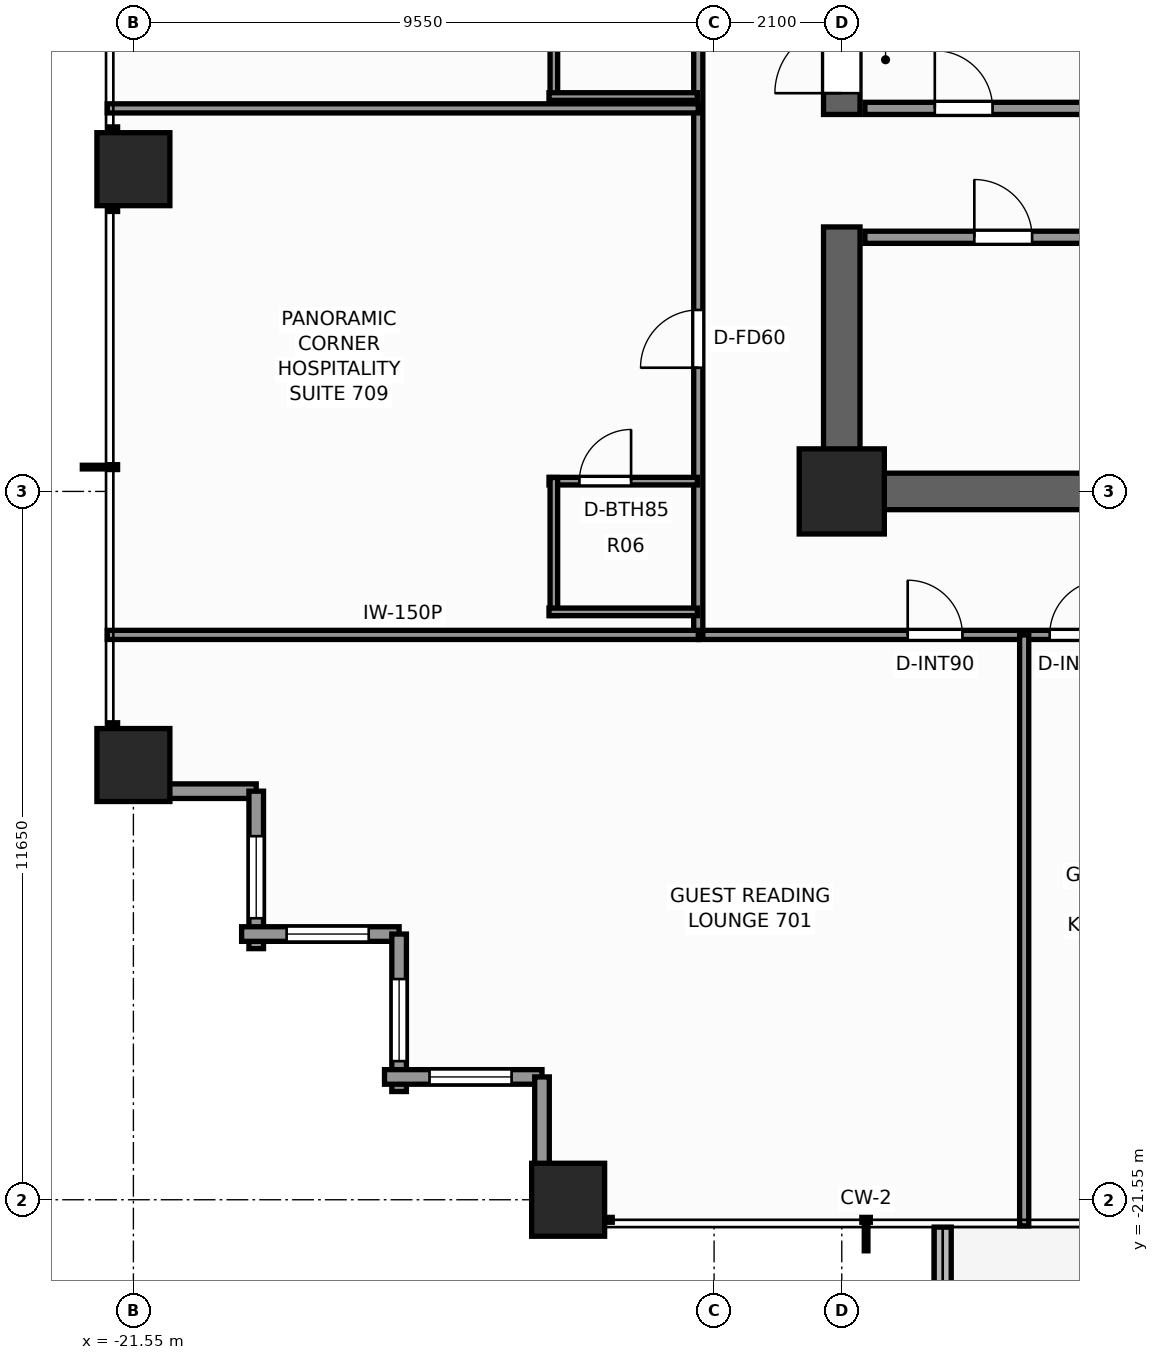
"""IFC4 building model, lengths in metres.
Left out: names, types, materials, properties, quantities, classifications, styles, units other than length and angle.
Written with IfcOpenShell. Run it as: python <this file> out.ifc"""

import sys

from ifc_helpers import new_model, si_unit, direction, frame, frame_2d, origin, origin_2d, place, context, subcontext, project, spatial, rectangle, extrude, element, fill, save


model = new_model("IFC4")
c1 = context("Model", 3, precision=1e-05, world=origin(), true_north=direction((0.0, 1.0)))
c2 = subcontext(c1, "Body", "Model", "MODEL_VIEW")
j1 = project(units=[si_unit("LENGTHUNIT", "METRE"), si_unit("PLANEANGLEUNIT", "RADIAN")], contexts=[c1])
p1 = place(None, origin())
s1 = spatial("IfcSite", under=j1, at=p1, CompositionType="ELEMENT")
p2 = place(p1, origin())
s2 = spatial("IfcBuilding", under=s1, at=p2, CompositionType="ELEMENT")
p3 = place(p2, frame((0.0, 0.0, 27.1)))
s3 = spatial("IfcBuildingStorey", under=s2, at=p3, CompositionType="ELEMENT", Elevation=27.1)
p4 = place(p3, frame((-3.54, -9.9, 0.0), z_axis=(0.0, 0.0, 1.0), x_axis=(-1.0, 0.0, 0.0)))
e1 = element("IfcWall", 1, at=p4, inside=s3, PredefinedType="SHEAR", context=c2, shape_type="SweptSolid", body=[
    extrude(rectangle(XDim=6.66, YDim=0.6, at=frame_2d((3.33, 0.0))), origin(), (0.0, 0.0, 1.0), 3.3),
])
p5 = place(p3, frame((-9.9, -9.6, 0.0), z_axis=(0.0, 0.0, 1.0), x_axis=(0.0, 1.0, 0.0)))
e2 = element("IfcWall", 2, at=p5, inside=s3, PredefinedType="SHEAR", context=c2, shape_type="SweptSolid", body=[
    extrude(rectangle(XDim=4.05, YDim=0.6, at=frame_2d((2.025, 0.0))), origin(), (0.0, 0.0, 1.0), 3.3),
])
p6 = place(p3, frame((-9.9, -3.7, 0.0), z_axis=(0.0, 0.0, 1.0), x_axis=(0.0, 1.0, 0.0)))
e3 = element("IfcWall", 3, at=p6, inside=s3, PredefinedType="SHEAR", context=c2, shape_type="SweptSolid", body=[
    extrude(rectangle(XDim=13.3, YDim=0.6, at=frame_2d((6.65, 0.0))), origin(), (0.0, 0.0, 1.0), 3.3),
])
p7 = place(p6, frame((0.35, 0.0, 0.0)))
e4 = element("IfcOpeningElement", 4, at=p7, cuts=e3, PredefinedType="OPENING", context=c2, shape_type="SweptSolid", body=[
    extrude(rectangle(XDim=1.1, YDim=2.2, at=frame_2d((0.55, 1.1))), frame((0.0, 0.31, 0.0), z_axis=(0.0, -1.0, 0.0), x_axis=(1.0, 0.0, 0.0)), (0.0, 0.0, 1.0), 0.62),
])
p8 = place(p3, frame((-9.9, -9.9, 0.0), z_axis=(0.0, 0.0, 1.0), x_axis=(1.0, 0.0, 0.0)))
e5 = element("IfcColumn", 5, at=p8, inside=s3, PredefinedType="COLUMN", context=c2, shape_type="SweptSolid", body=[
    extrude(rectangle(XDim=1.4, YDim=1.4, at=origin_2d()), origin(), (0.0, 0.0, 1.0), 3.3),
])
for number, where, z_axis, x_axis in (
    (6, (-14.4, -21.55, 0.0), (0.0, 0.0, 1.0), (1.0, 0.0, 0.0)),
    (7, (-21.55, -14.4, 0.0), (0.0, 0.0, 1.0), (1.0, 0.0, 0.0)),
    (8, (-21.55, -4.6, 0.0), (0.0, 0.0, 1.0), (1.0, 0.0, 0.0)),
):
    element("IfcColumn", number, at=place(p3, frame(where, z_axis=z_axis, x_axis=x_axis)), inside=s3, PredefinedType="COLUMN", context=c2, shape_type="SweptSolid", body=[
        extrude(rectangle(XDim=1.2, YDim=1.2, at=origin_2d()), origin(), (0.0, 0.0, 1.0), 3.3),
    ])
p9 = place(p3, frame((-8.24, -22.0, -0.06), z_axis=(0.0, 0.0, 1.0), x_axis=(0.0, -1.0, 0.0)))
e9 = element("IfcWall", 9, at=p9, inside=s3, PredefinedType="PARAPET", context=c2, shape_type="SweptSolid", body=[
    extrude(rectangle(XDim=2.674, YDim=0.28, at=frame_2d((1.337, 0.0))), origin(), (0.0, 0.0, 1.0), 0.42),
])
p10 = place(p3, frame((-19.53, -14.83, 0.0), z_axis=(0.0, 0.0, 1.0), x_axis=(-1.0, 0.0, 0.0)))
e10 = element("IfcWall", 10, at=p10, inside=s3, PredefinedType="STANDARD", context=c2, shape_type="SweptSolid", body=[
    extrude(rectangle(XDim=2.59, YDim=0.24, at=frame_2d((1.295, 0.0))), origin(), (0.0, 0.0, 1.0), 2.439),
])
p11 = place(p3, frame((-19.53, -17.42, 0.0), z_axis=(0.0, 0.0, 1.0), x_axis=(0.0, 1.0, 0.0)))
e11 = element("IfcWall", 11, at=p11, inside=s3, PredefinedType="STANDARD", context=c2, shape_type="SweptSolid", body=[
    extrude(rectangle(XDim=2.59, YDim=0.24, at=frame_2d((1.295, 0.0))), origin(), (0.0, 0.0, 1.0), 2.439),
])
p12 = place(p11, frame((0.5, 0.0, 0.65)))
e12 = element("IfcOpeningElement", 12, at=p12, cuts=e11, PredefinedType="OPENING", context=c2, shape_type="SweptSolid", body=[
    extrude(rectangle(XDim=1.35, YDim=1.55, at=frame_2d((0.675, 0.775))), frame((0.0, 0.13, 0.0), z_axis=(0.0, -1.0, 0.0), x_axis=(1.0, 0.0, 0.0)), (0.0, 0.0, 1.0), 0.26),
])
p13 = place(p3, frame((-17.18, -17.18, 0.0), z_axis=(0.0, 0.0, 1.0), x_axis=(-1.0, 0.0, 0.0)))
e13 = element("IfcWall", 13, at=p13, inside=s3, PredefinedType="STANDARD", context=c2, shape_type="SweptSolid", body=[
    extrude(rectangle(XDim=2.59, YDim=0.24, at=frame_2d((1.295, 0.0))), origin(), (0.0, 0.0, 1.0), 2.439),
])
p14 = place(p13, frame((0.5, 0.0, 0.65)))
e14 = element("IfcOpeningElement", 14, at=p14, cuts=e13, PredefinedType="OPENING", context=c2, shape_type="SweptSolid", body=[
    extrude(rectangle(XDim=1.35, YDim=1.55, at=frame_2d((0.675, 0.775))), frame((0.0, 0.13, 0.0), z_axis=(0.0, -1.0, 0.0), x_axis=(1.0, 0.0, 0.0)), (0.0, 0.0, 1.0), 0.26),
])
p15 = place(p3, frame((-17.18, -19.77, 0.0), z_axis=(0.0, 0.0, 1.0), x_axis=(0.0, 1.0, 0.0)))
e15 = element("IfcWall", 15, at=p15, inside=s3, PredefinedType="STANDARD", context=c2, shape_type="SweptSolid", body=[
    extrude(rectangle(XDim=2.59, YDim=0.24, at=frame_2d((1.295, 0.0))), origin(), (0.0, 0.0, 1.0), 2.439),
])
p16 = place(p15, frame((0.5, 0.0, 0.65)))
e16 = element("IfcOpeningElement", 16, at=p16, cuts=e15, PredefinedType="OPENING", context=c2, shape_type="SweptSolid", body=[
    extrude(rectangle(XDim=1.35, YDim=1.55, at=frame_2d((0.675, 0.775))), frame((0.0, 0.13, 0.0), z_axis=(0.0, -1.0, 0.0), x_axis=(1.0, 0.0, 0.0)), (0.0, 0.0, 1.0), 0.26),
])
p17 = place(p3, frame((-14.83, -19.53, 0.0), z_axis=(0.0, 0.0, 1.0), x_axis=(-1.0, 0.0, 0.0)))
e17 = element("IfcWall", 17, at=p17, inside=s3, PredefinedType="STANDARD", context=c2, shape_type="SweptSolid", body=[
    extrude(rectangle(XDim=2.59, YDim=0.24, at=frame_2d((1.295, 0.0))), origin(), (0.0, 0.0, 1.0), 2.439),
])
p18 = place(p17, frame((0.5, 0.0, 0.65)))
e18 = element("IfcOpeningElement", 18, at=p18, cuts=e17, PredefinedType="OPENING", context=c2, shape_type="SweptSolid", body=[
    extrude(rectangle(XDim=1.35, YDim=1.55, at=frame_2d((0.675, 0.775))), frame((0.0, 0.13, 0.0), z_axis=(0.0, -1.0, 0.0), x_axis=(1.0, 0.0, 0.0)), (0.0, 0.0, 1.0), 0.26),
])
p19 = place(p3, frame((-14.83, -22.12, 0.0), z_axis=(0.0, 0.0, 1.0), x_axis=(0.0, 1.0, 0.0)))
e19 = element("IfcWall", 19, at=p19, inside=s3, PredefinedType="STANDARD", context=c2, shape_type="SweptSolid", body=[
    extrude(rectangle(XDim=2.59, YDim=0.24, at=frame_2d((1.295, 0.0))), origin(), (0.0, 0.0, 1.0), 2.439),
])
p20 = place(p3, frame((-9.52, -3.6, 0.0), z_axis=(0.0, 0.0, 1.0), x_axis=(1.0, 0.0, 0.0)))
e20 = element("IfcWall", 20, at=p20, inside=s3, PredefinedType="SOLIDWALL", context=c2, shape_type="SweptSolid", body=[
    extrude(rectangle(XDim=3.77, YDim=0.2, at=frame_2d((1.885, 0.0))), origin(), (0.0, 0.0, 1.0), 3.06),
])
p21 = place(p20, frame((1.15, 0.0, 0.0)))
e21 = element("IfcOpeningElement", 21, at=p21, cuts=e20, PredefinedType="OPENING", context=c2, shape_type="SweptSolid", body=[
    extrude(rectangle(XDim=0.95, YDim=2.06, at=frame_2d((0.475, 1.03))), frame((0.0, 0.11, 0.0), z_axis=(0.0, -1.0, 0.0), x_axis=(1.0, 0.0, 0.0)), (0.0, 0.0, 1.0), 0.22),
])
p22 = place(p3, frame((-9.52, -5.72, 0.0), z_axis=(0.0, 0.0, 1.0), x_axis=(1.0, 0.0, 0.0)))
e22 = element("IfcWall", 22, at=p22, inside=s3, PredefinedType="SOLIDWALL", context=c2, shape_type="SweptSolid", body=[
    extrude(rectangle(XDim=5.66, YDim=0.2, at=frame_2d((2.83, 0.0))), origin(), (0.0, 0.0, 1.0), 3.06),
])
p23 = place(p22, frame((1.8, 0.0, 0.0)))
e23 = element("IfcOpeningElement", 23, at=p23, cuts=e22, PredefinedType="OPENING", context=c2, shape_type="SweptSolid", body=[
    extrude(rectangle(XDim=0.95, YDim=2.06, at=frame_2d((0.475, 1.03))), frame((0.0, 0.11, 0.0), z_axis=(0.0, -1.0, 0.0), x_axis=(1.0, 0.0, 0.0)), (0.0, 0.0, 1.0), 0.22),
])
p24 = place(p3, frame((-12.26, -12.26, 0.0), z_axis=(0.0, 0.0, 1.0), x_axis=(1.0, 0.0, 0.0)))
e24 = element("IfcWall", 24, at=p24, inside=s3, PredefinedType="PARTITIONING", context=c2, shape_type="SweptSolid", body=[
    extrude(rectangle(XDim=24.68, YDim=0.15, at=frame_2d((12.34, 0.0))), origin(), (0.0, 0.0, 1.0), 2.272),
])
p25 = place(p24, frame((3.444, 0.0, 0.0)))
e25 = element("IfcOpeningElement", 25, at=p25, cuts=e24, PredefinedType="OPENING", context=c2, shape_type="SweptSolid", body=[
    extrude(rectangle(XDim=0.9, YDim=2.06, at=frame_2d((0.45, 1.03))), frame((0.0, 0.085, 0.0), z_axis=(0.0, -1.0, 0.0), x_axis=(1.0, 0.0, 0.0)), (0.0, 0.0, 1.0), 0.17),
])
p26 = place(p24, frame((5.779, 0.0, 0.0)))
e26 = element("IfcOpeningElement", 26, at=p26, cuts=e24, PredefinedType="OPENING", context=c2, shape_type="SweptSolid", body=[
    extrude(rectangle(XDim=0.9, YDim=2.06, at=frame_2d((0.45, 1.03))), frame((0.0, 0.085, 0.0), z_axis=(0.0, -1.0, 0.0), x_axis=(1.0, 0.0, 0.0)), (0.0, 0.0, 1.0), 0.17),
])
p27 = place(p24, frame((13.551, 0.0, 0.0)))
e27 = element("IfcOpeningElement", 27, at=p27, cuts=e24, PredefinedType="OPENING", context=c2, shape_type="SweptSolid", body=[
    extrude(rectangle(XDim=0.9, YDim=2.06, at=frame_2d((0.45, 1.03))), frame((0.0, 0.085, 0.0), z_axis=(0.0, -1.0, 0.0), x_axis=(1.0, 0.0, 0.0)), (0.0, 0.0, 1.0), 0.17),
])
p28 = place(p24, frame((17.921, 0.0, 0.0)))
e28 = element("IfcOpeningElement", 28, at=p28, cuts=e24, PredefinedType="OPENING", context=c2, shape_type="SweptSolid", body=[
    extrude(rectangle(XDim=0.9, YDim=2.06, at=frame_2d((0.45, 1.03))), frame((0.0, 0.085, 0.0), z_axis=(0.0, -1.0, 0.0), x_axis=(1.0, 0.0, 0.0)), (0.0, 0.0, 1.0), 0.17),
])
p29 = place(p24, frame((20.256, 0.0, 0.0)))
e29 = element("IfcOpeningElement", 29, at=p29, cuts=e24, PredefinedType="OPENING", context=c2, shape_type="SweptSolid", body=[
    extrude(rectangle(XDim=0.9, YDim=2.06, at=frame_2d((0.45, 1.03))), frame((0.0, 0.085, 0.0), z_axis=(0.0, -1.0, 0.0), x_axis=(1.0, 0.0, 0.0)), (0.0, 0.0, 1.0), 0.17),
])
p30 = place(p3, frame((-12.26, -12.26, 0.0), z_axis=(0.0, 0.0, 1.0), x_axis=(0.0, 1.0, 0.0)))
e30 = element("IfcWall", 30, at=p30, inside=s3, PredefinedType="PARTITIONING", context=c2, shape_type="SweptSolid", body=[
    extrude(rectangle(XDim=24.84, YDim=0.15, at=frame_2d((12.42, 0.0))), origin(), (0.0, 0.0, 1.0), 2.272),
])
p31 = place(p30, frame((4.395, 0.0, 0.0)))
e31 = element("IfcOpeningElement", 31, at=p31, cuts=e30, PredefinedType="OPENING", context=c2, shape_type="SweptSolid", body=[
    extrude(rectangle(XDim=0.95, YDim=2.06, at=frame_2d((0.475, 1.03))), frame((0.0, 0.085, 0.0), z_axis=(0.0, -1.0, 0.0), x_axis=(1.0, 0.0, 0.0)), (0.0, 0.0, 1.0), 0.17),
])
p32 = place(p30, frame((13.815, 0.0, 0.0)))
e32 = element("IfcOpeningElement", 32, at=p32, cuts=e30, PredefinedType="OPENING", context=c2, shape_type="SweptSolid", body=[
    extrude(rectangle(XDim=0.95, YDim=2.06, at=frame_2d((0.475, 1.03))), frame((0.0, 0.085, 0.0), z_axis=(0.0, -1.0, 0.0), x_axis=(1.0, 0.0, 0.0)), (0.0, 0.0, 1.0), 0.17),
])
p33 = place(p30, frame((20.268, 0.0, 0.0)))
e33 = element("IfcOpeningElement", 33, at=p33, cuts=e30, PredefinedType="OPENING", context=c2, shape_type="SweptSolid", body=[
    extrude(rectangle(XDim=0.95, YDim=2.06, at=frame_2d((0.475, 1.03))), frame((0.0, 0.085, 0.0), z_axis=(0.0, -1.0, 0.0), x_axis=(1.0, 0.0, 0.0)), (0.0, 0.0, 1.0), 0.17),
])
p34 = place(p3, frame((-21.98, -12.26, 0.0), z_axis=(0.0, 0.0, 1.0), x_axis=(1.0, 0.0, 0.0)))
e34 = element("IfcWall", 34, at=p34, inside=s3, PredefinedType="PARTITIONING", context=c2, shape_type="SweptSolid", body=[
    extrude(rectangle(XDim=9.72, YDim=0.15, at=frame_2d((4.86, 0.0))), origin(), (0.0, 0.0, 1.0), 2.272),
])
for number, where, z_axis, x_axis in (
    (35, (-6.9, -21.98, 0.0), (0.0, 0.0, 1.0), (0.0, 1.0, 0.0)),
    (36, (-21.98, -3.6, 0.0), (0.0, 0.0, 1.0), (1.0, 0.0, 0.0)),
):
    element("IfcWall", number, at=place(p3, frame(where, z_axis=z_axis, x_axis=x_axis)), inside=s3, PredefinedType="PARTITIONING", context=c2, shape_type="SweptSolid", body=[
        extrude(rectangle(XDim=9.72, YDim=0.15, at=frame_2d((4.86, 0.0))), origin(), (0.0, 0.0, 1.0), 2.429),
    ])
p35 = place(p3, frame((-14.715, -9.731, 0.0), z_axis=(0.0, 0.0, 1.0), x_axis=(1.0, 0.0, 0.0)))
e37 = element("IfcWall", 37, at=p35, inside=s3, PredefinedType="PARTITIONING", context=c2, shape_type="SweptSolid", body=[
    extrude(rectangle(XDim=2.44, YDim=0.125, at=frame_2d((1.22, 0.0))), origin(), (0.0, 0.0, 1.0), 3.06),
])
p36 = place(p35, frame((0.5, 0.0, 0.0)))
e38 = element("IfcOpeningElement", 38, at=p36, cuts=e37, PredefinedType="OPENING", context=c2, shape_type="SweptSolid", body=[
    extrude(rectangle(XDim=0.85, YDim=2.03, at=frame_2d((0.425, 1.015))), frame((0.0, 0.073, 0.0), z_axis=(0.0, -1.0, 0.0), x_axis=(1.0, 0.0, 0.0)), (0.0, 0.0, 1.0), 0.145),
])
p37 = place(p3, frame((-14.635, -11.941, 0.0), z_axis=(0.0, 0.0, 1.0), x_axis=(0.0, 1.0, 0.0)))
e39 = element("IfcWall", 39, at=p37, inside=s3, PredefinedType="PARTITIONING", context=c2, shape_type="SweptSolid", body=[
    extrude(rectangle(XDim=2.27, YDim=0.125, at=frame_2d((1.135, 0.0))), origin(), (0.0, 0.0, 1.0), 2.272),
])
p38 = place(p3, frame((-14.715, -11.881, 0.0), z_axis=(0.0, 0.0, 1.0), x_axis=(1.0, 0.0, 0.0)))
e40 = element("IfcWall", 40, at=p38, inside=s3, PredefinedType="PARTITIONING", context=c2, shape_type="SweptSolid", body=[
    extrude(rectangle(XDim=2.44, YDim=0.125, at=frame_2d((1.22, 0.0))), origin(), (0.0, 0.0, 1.0), 2.272),
])
p39 = place(p3, frame((-14.635, -3.465, 0.0), z_axis=(0.0, 0.0, 1.0), x_axis=(0.0, 1.0, 0.0)))
e41 = element("IfcWall", 41, at=p39, inside=s3, PredefinedType="PARTITIONING", context=c2, shape_type="SweptSolid", body=[
    extrude(rectangle(XDim=2.27, YDim=0.125, at=frame_2d((1.135, 0.0))), origin(), (0.0, 0.0, 1.0), 3.06),
])
p40 = place(p3, frame((-14.715, -3.405, 0.0), z_axis=(0.0, 0.0, 1.0), x_axis=(1.0, 0.0, 0.0)))
e42 = element("IfcWall", 42, at=p40, inside=s3, PredefinedType="PARTITIONING", context=c2, shape_type="SweptSolid", body=[
    extrude(rectangle(XDim=2.44, YDim=0.125, at=frame_2d((1.22, 0.0))), origin(), (0.0, 0.0, 1.0), 3.06),
])
p41 = place(p12, origin())
e43 = element("IfcWindow", 43, at=p41, inside=s3, PartitioningType="SINGLE_PANEL", PredefinedType="WINDOW", context=c2, shape_type="SweptSolid", body=[
    extrude(rectangle(XDim=1.35, YDim=1.55, at=frame_2d((0.675, 0.775))), frame((0.0, 0.03, 0.0), z_axis=(0.0, -1.0, 0.0), x_axis=(1.0, 0.0, 0.0)), (0.0, 0.0, 1.0), 0.06),
])
fill(e12, e43)
p42 = place(p14, origin())
e44 = element("IfcWindow", 44, at=p42, inside=s3, PartitioningType="SINGLE_PANEL", PredefinedType="WINDOW", context=c2, shape_type="SweptSolid", body=[
    extrude(rectangle(XDim=1.35, YDim=1.55, at=frame_2d((0.675, 0.775))), frame((0.0, 0.03, 0.0), z_axis=(0.0, -1.0, 0.0), x_axis=(1.0, 0.0, 0.0)), (0.0, 0.0, 1.0), 0.06),
])
fill(e14, e44)
p43 = place(p16, origin())
e45 = element("IfcWindow", 45, at=p43, inside=s3, PartitioningType="SINGLE_PANEL", PredefinedType="WINDOW", context=c2, shape_type="SweptSolid", body=[
    extrude(rectangle(XDim=1.35, YDim=1.55, at=frame_2d((0.675, 0.775))), frame((0.0, 0.03, 0.0), z_axis=(0.0, -1.0, 0.0), x_axis=(1.0, 0.0, 0.0)), (0.0, 0.0, 1.0), 0.06),
])
fill(e16, e45)
p44 = place(p18, origin())
e46 = element("IfcWindow", 46, at=p44, inside=s3, PartitioningType="SINGLE_PANEL", PredefinedType="WINDOW", context=c2, shape_type="SweptSolid", body=[
    extrude(rectangle(XDim=1.35, YDim=1.55, at=frame_2d((0.675, 0.775))), frame((0.0, 0.03, 0.0), z_axis=(0.0, -1.0, 0.0), x_axis=(1.0, 0.0, 0.0)), (0.0, 0.0, 1.0), 0.06),
])
fill(e18, e46)
p45 = place(p7, origin())
e47 = element("IfcDoor", 47, at=p45, inside=s3, OperationType="SINGLE_SWING_LEFT", PredefinedType="DOOR", context=c2, shape_type="SweptSolid", body=[
    extrude(rectangle(XDim=1.1, YDim=2.2, at=frame_2d((0.55, 1.1))), frame((0.0, 0.025, 0.0), z_axis=(0.0, -1.0, 0.0), x_axis=(1.0, 0.0, 0.0)), (0.0, 0.0, 1.0), 0.05),
])
fill(e4, e47)
p46 = place(p23, origin())
e48 = element("IfcDoor", 48, at=p46, inside=s3, OperationType="SINGLE_SWING_LEFT", PredefinedType="DOOR", context=c2, shape_type="SweptSolid", body=[
    extrude(rectangle(XDim=0.95, YDim=2.06, at=frame_2d((0.475, 1.03))), frame((0.0, 0.025, 0.0), z_axis=(0.0, -1.0, 0.0), x_axis=(1.0, 0.0, 0.0)), (0.0, 0.0, 1.0), 0.05),
])
fill(e23, e48)
p47 = place(p21, origin())
e49 = element("IfcDoor", 49, at=p47, inside=s3, OperationType="SINGLE_SWING_LEFT", PredefinedType="DOOR", context=c2, shape_type="SweptSolid", body=[
    extrude(rectangle(XDim=0.95, YDim=2.06, at=frame_2d((0.475, 1.03))), frame((0.0, 0.025, 0.0), z_axis=(0.0, -1.0, 0.0), x_axis=(1.0, 0.0, 0.0)), (0.0, 0.0, 1.0), 0.05),
])
fill(e21, e49)
p48 = place(p25, origin())
e50 = element("IfcDoor", 50, at=p48, inside=s3, OperationType="SINGLE_SWING_LEFT", PredefinedType="DOOR", context=c2, shape_type="SweptSolid", body=[
    extrude(rectangle(XDim=0.9, YDim=2.06, at=frame_2d((0.45, 1.03))), frame((0.0, 0.025, 0.0), z_axis=(0.0, -1.0, 0.0), x_axis=(1.0, 0.0, 0.0)), (0.0, 0.0, 1.0), 0.05),
])
fill(e25, e50)
p49 = place(p26, origin())
e51 = element("IfcDoor", 51, at=p49, inside=s3, OperationType="SINGLE_SWING_RIGHT", PredefinedType="DOOR", context=c2, shape_type="SweptSolid", body=[
    extrude(rectangle(XDim=0.9, YDim=2.06, at=frame_2d((0.45, 1.03))), frame((0.0, 0.025, 0.0), z_axis=(0.0, -1.0, 0.0), x_axis=(1.0, 0.0, 0.0)), (0.0, 0.0, 1.0), 0.05),
])
fill(e26, e51)
p50 = place(p36, origin())
e52 = element("IfcDoor", 52, at=p50, inside=s3, OperationType="SINGLE_SWING_RIGHT", PredefinedType="DOOR", context=c2, shape_type="SweptSolid", body=[
    extrude(rectangle(XDim=0.85, YDim=2.03, at=frame_2d((0.425, 1.015))), frame((0.0, 0.025, 0.0), z_axis=(0.0, -1.0, 0.0), x_axis=(1.0, 0.0, 0.0)), (0.0, 0.0, 1.0), 0.05),
])
fill(e38, e52)
p51 = place(p31, origin())
e53 = element("IfcDoor", 53, at=p51, inside=s3, OperationType="SINGLE_SWING_LEFT", PredefinedType="DOOR", context=c2, shape_type="SweptSolid", body=[
    extrude(rectangle(XDim=0.95, YDim=2.06, at=frame_2d((0.475, 1.03))), frame((0.0, 0.025, 0.0), z_axis=(0.0, -1.0, 0.0), x_axis=(1.0, 0.0, 0.0)), (0.0, 0.0, 1.0), 0.05),
])
fill(e31, e53)
save(model, sys.argv[1])
